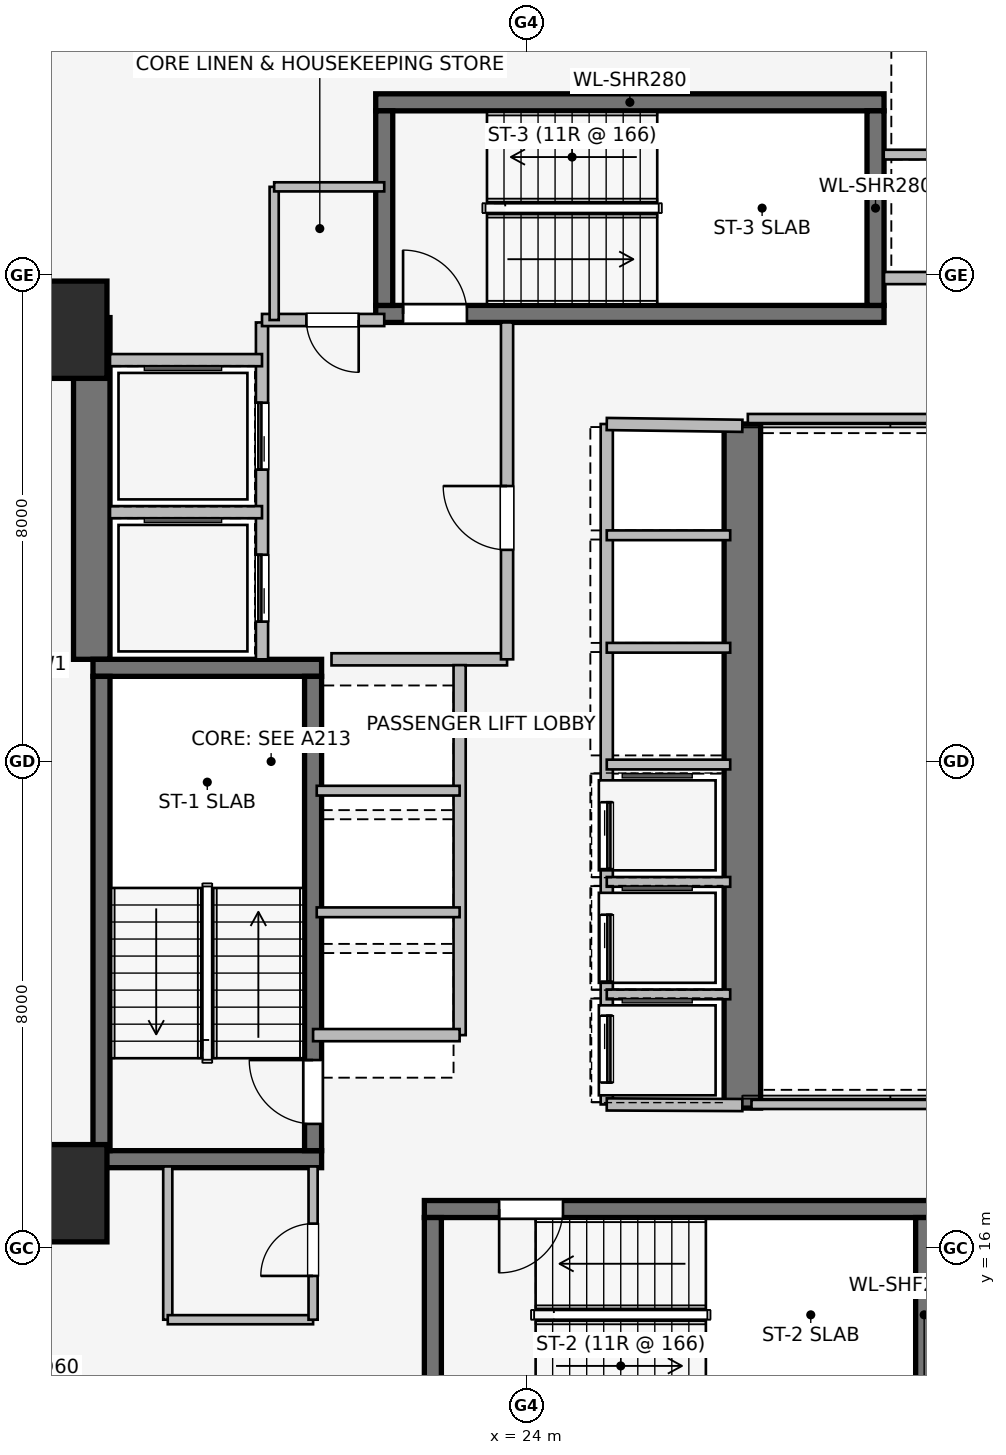
"""IFC4 building model, lengths in metres.
Left out: names, types, materials, properties, quantities, classifications, styles, units other than length and angle.
Written with IfcOpenShell. Run it as: python <this file> out.ifc"""

import sys

from ifc_helpers import new_model, si_unit, direction, frame, frame_2d, origin, origin_2d, place, context, subcontext, project, spatial, rectangle, extrude, element, fill, save


model = new_model("IFC4")
c1 = context("Model", 3, precision=1e-05, world=origin(), true_north=direction((0.0, 1.0)))
c2 = subcontext(c1, "Body", "Model", "MODEL_VIEW")
j1 = project(units=[si_unit("LENGTHUNIT", "METRE"), si_unit("PLANEANGLEUNIT", "RADIAN")], contexts=[c1])
p1 = place(None, origin())
s1 = spatial("IfcSite", under=j1, at=p1, CompositionType="ELEMENT")
p2 = place(p1, origin())
s2 = spatial("IfcBuilding", under=s1, at=p2, CompositionType="ELEMENT")
p3 = place(p2, frame((0.0, 0.0, 45.25)))
s3 = spatial("IfcBuildingStorey", under=s2, at=p3, CompositionType="ELEMENT", Elevation=45.25)
p4 = place(p3, frame((16.85, 25.68, 0.0), z_axis=(0.0, 0.0, 1.0), x_axis=(0.0, 1.0, 0.0)))
e1 = element("IfcWall", 1, at=p4, inside=s3, PredefinedType="SHEAR", context=c2, shape_type="SweptSolid", body=[
    extrude(rectangle(XDim=5.62, YDim=0.6, at=frame_2d((2.81, 0.0))), origin(), (0.0, 0.0, 1.0), 3.65),
])
p5 = place(p3, frame((27.55, 29.55, 0.0), z_axis=(0.0, 0.0, 1.0), x_axis=(0.0, -1.0, 0.0)))
e2 = element("IfcWall", 2, at=p5, inside=s3, PredefinedType="SHEAR", context=c2, shape_type="SweptSolid", body=[
    extrude(rectangle(XDim=11.25, YDim=0.6, at=frame_2d((5.625, 0.0))), origin(), (0.0, 0.0, 1.0), 3.65),
])
for number, where, z_axis, x_axis in (
    (3, (16.87, 17.46, 0.0), (0.0, 0.0, 1.0), (1.0, 0.0, 0.0)),
    (4, (20.63, 25.54, 0.0), (0.0, 0.0, 1.0), (-1.0, 0.0, 0.0)),
):
    element("IfcWall", number, at=place(p3, frame(where, z_axis=z_axis, x_axis=x_axis)), inside=s3, PredefinedType="SHEAR", context=c2, shape_type="SweptSolid", body=[
        extrude(rectangle(XDim=3.76, YDim=0.28, at=frame_2d((1.88, 0.0))), origin(), (0.0, 0.0, 1.0), 3.65),
    ])
p6 = place(p3, frame((17.01, 25.4, 0.0), z_axis=(0.0, 0.0, 1.0), x_axis=(0.0, -1.0, 0.0)))
e5 = element("IfcWall", 5, at=p6, inside=s3, PredefinedType="SHEAR", context=c2, shape_type="SweptSolid", body=[
    extrude(rectangle(XDim=7.8, YDim=0.28, at=frame_2d((3.9, 0.0))), origin(), (0.0, 0.0, 1.0), 3.65),
])
p7 = place(p3, frame((20.49, 17.6, 0.0), z_axis=(0.0, 0.0, 1.0), x_axis=(0.0, 1.0, 0.0)))
e6 = element("IfcWall", 6, at=p7, inside=s3, PredefinedType="SHEAR", context=c2, shape_type="SweptSolid", body=[
    extrude(rectangle(XDim=7.8, YDim=0.28, at=frame_2d((3.9, 0.0))), origin(), (0.0, 0.0, 1.0), 3.65),
])
p8 = place(p7, frame((0.44, 0.0, 0.0)))
e7 = element("IfcOpeningElement", 7, at=p8, cuts=e6, PredefinedType="OPENING", context=c2, shape_type="SweptSolid", body=[
    extrude(rectangle(XDim=1.05, YDim=2.0, at=frame_2d((0.525, 1.0))), frame((0.0, 0.15, 0.0), z_axis=(0.0, -1.0, 0.0), x_axis=(1.0, 0.0, 0.0)), (0.0, 0.0, 1.0), 0.3),
])
p9 = place(p3, frame((30.68, 16.64, 0.0), z_axis=(0.0, 0.0, 1.0), x_axis=(-1.0, 0.0, 0.0)))
e8 = element("IfcWall", 8, at=p9, inside=s3, PredefinedType="SHEAR", context=c2, shape_type="SweptSolid", body=[
    extrude(rectangle(XDim=8.36, YDim=0.28, at=frame_2d((4.18, 0.0))), origin(), (0.0, 0.0, 1.0), 3.65),
])
p10 = place(p9, frame((6.08, 0.0, 0.0)))
e9 = element("IfcOpeningElement", 9, at=p10, cuts=e8, PredefinedType="OPENING", context=c2, shape_type="SweptSolid", body=[
    extrude(rectangle(XDim=1.05, YDim=2.0, at=frame_2d((0.525, 1.0))), frame((0.0, 0.15, 0.0), z_axis=(0.0, -1.0, 0.0), x_axis=(1.0, 0.0, 0.0)), (0.0, 0.0, 1.0), 0.3),
])
for number, where, z_axis, x_axis in (
    (10, (22.46, 16.5, 0.0), (0.0, 0.0, 1.0), (0.0, -1.0, 0.0)),
    (11, (30.54, 13.3, 0.0), (0.0, 0.0, 1.0), (0.0, 1.0, 0.0)),
):
    element("IfcWall", number, at=place(p3, frame(where, z_axis=z_axis, x_axis=x_axis)), inside=s3, PredefinedType="SHEAR", context=c2, shape_type="SweptSolid", body=[
        extrude(rectangle(XDim=3.2, YDim=0.28, at=frame_2d((1.6, 0.0))), origin(), (0.0, 0.0, 1.0), 3.65),
    ])
p11 = place(p3, frame((21.52, 31.36, 0.0), z_axis=(0.0, 0.0, 1.0), x_axis=(1.0, 0.0, 0.0)))
e12 = element("IfcWall", 12, at=p11, inside=s3, PredefinedType="SHEAR", context=c2, shape_type="SweptSolid", body=[
    extrude(rectangle(XDim=8.36, YDim=0.28, at=frame_2d((4.18, 0.0))), origin(), (0.0, 0.0, 1.0), 3.65),
])
p12 = place(p11, frame((0.45, 0.0, 0.0)))
e13 = element("IfcOpeningElement", 13, at=p12, cuts=e12, PredefinedType="OPENING", context=c2, shape_type="SweptSolid", body=[
    extrude(rectangle(XDim=1.05, YDim=2.0, at=frame_2d((0.525, 1.0))), frame((0.0, 0.15, 0.0), z_axis=(0.0, -1.0, 0.0), x_axis=(1.0, 0.0, 0.0)), (0.0, 0.0, 1.0), 0.3),
])
p13 = place(p3, frame((29.88, 34.84, 0.0), z_axis=(0.0, 0.0, 1.0), x_axis=(-1.0, 0.0, 0.0)))
e14 = element("IfcWall", 14, at=p13, inside=s3, PredefinedType="SHEAR", context=c2, shape_type="SweptSolid", body=[
    extrude(rectangle(XDim=8.36, YDim=0.28, at=frame_2d((4.18, 0.0))), origin(), (0.0, 0.0, 1.0), 3.65),
])
for number, where, z_axis, x_axis in (
    (15, (21.66, 34.7, 0.0), (0.0, 0.0, 1.0), (0.0, -1.0, 0.0)),
    (16, (29.74, 31.5, 0.0), (0.0, 0.0, 1.0), (0.0, 1.0, 0.0)),
):
    element("IfcWall", number, at=place(p3, frame(where, z_axis=z_axis, x_axis=x_axis)), inside=s3, PredefinedType="SHEAR", context=c2, shape_type="SweptSolid", body=[
        extrude(rectangle(XDim=3.2, YDim=0.28, at=frame_2d((1.6, 0.0))), origin(), (0.0, 0.0, 1.0), 3.65),
    ])
for number, where, z_axis, x_axis in (
    (17, (16.3, 16.9, 0.0), (0.0, 0.0, 1.0), (1.0, 0.0, 0.0)),
    (18, (16.3, 31.1, 0.0), (0.0, 0.0, 1.0), (1.0, 0.0, 0.0)),
):
    element("IfcColumn", number, at=place(p3, frame(where, z_axis=z_axis, x_axis=x_axis)), inside=s3, PredefinedType="COLUMN", context=c2, shape_type="SweptSolid", body=[
        extrude(rectangle(XDim=1.6, YDim=1.6, at=origin_2d()), origin(), (0.0, 0.0, 1.0), 3.65),
    ])
p14 = place(p3, frame((19.65, 25.68, 0.0), z_axis=(0.0, 0.0, 1.0), x_axis=(0.0, 1.0, 0.0)))
e19 = element("IfcWall", 19, at=p14, inside=s3, PredefinedType="PARTITIONING", context=c2, shape_type="SweptSolid", body=[
    extrude(rectangle(XDim=5.54, YDim=0.2, at=frame_2d((2.77, 0.0))), origin(), (0.0, 0.0, 1.0), 3.39),
])
p15 = place(p14, frame((0.62, 0.0, 0.0)))
e20 = element("IfcOpeningElement", 20, at=p15, cuts=e19, PredefinedType="OPENING", context=c2, shape_type="SweptSolid", body=[
    extrude(rectangle(XDim=1.1, YDim=2.2, at=frame_2d((0.55, 1.1))), frame((0.0, 0.11, 0.0), z_axis=(0.0, -1.0, 0.0), x_axis=(1.0, 0.0, 0.0)), (0.0, 0.0, 1.0), 0.22),
])
p16 = place(p14, frame((3.12, 0.0, 0.0)))
e21 = element("IfcOpeningElement", 21, at=p16, cuts=e19, PredefinedType="OPENING", context=c2, shape_type="SweptSolid", body=[
    extrude(rectangle(XDim=1.1, YDim=2.2, at=frame_2d((0.55, 1.1))), frame((0.0, 0.11, 0.0), z_axis=(0.0, -1.0, 0.0), x_axis=(1.0, 0.0, 0.0)), (0.0, 0.0, 1.0), 0.22),
])
p17 = place(p3, frame((20.793, 25.68, 0.0), z_axis=(0.0, 0.0, 1.0), x_axis=(1.0, 0.0, 0.0)))
e22 = element("IfcWall", 22, at=p17, inside=s3, PredefinedType="PARTITIONING", context=c2, shape_type="SweptSolid", body=[
    extrude(rectangle(XDim=2.887, YDim=0.2, at=frame_2d((1.443, 0.0))), origin(), (0.0, 0.0, 1.0), 3.39),
])
p18 = place(p3, frame((23.68, 25.68, 0.0), z_axis=(0.0, 0.0, 1.0), x_axis=(0.0, 1.0, 0.0)))
e23 = element("IfcWall", 23, at=p18, inside=s3, PredefinedType="PARTITIONING", context=c2, shape_type="SweptSolid", body=[
    extrude(rectangle(XDim=5.54, YDim=0.2, at=frame_2d((2.77, 0.0))), origin(), (0.0, 0.0, 1.0), 3.39),
])
p19 = place(p18, frame((1.8, 0.0, 0.0)))
e24 = element("IfcOpeningElement", 24, at=p19, cuts=e23, PredefinedType="OPENING", context=c2, shape_type="SweptSolid", body=[
    extrude(rectangle(XDim=1.05, YDim=2.0, at=frame_2d((0.525, 1.0))), frame((0.0, 0.11, 0.0), z_axis=(0.0, -1.0, 0.0), x_axis=(1.0, 0.0, 0.0)), (0.0, 0.0, 1.0), 0.22),
])
p20 = place(p3, frame((21.66, 31.26, 0.0), z_axis=(0.0, 0.0, 1.0), x_axis=(-1.0, 0.0, 0.0)))
e25 = element("IfcWall", 25, at=p20, inside=s3, PredefinedType="PARTITIONING", context=c2, shape_type="SweptSolid", body=[
    extrude(rectangle(XDim=2.01, YDim=0.2, at=frame_2d((1.005, 0.0))), origin(), (0.0, 0.0, 1.0), 3.39),
])
p21 = place(p20, frame((0.42, 0.0, 0.0)))
e26 = element("IfcOpeningElement", 26, at=p21, cuts=e25, PredefinedType="OPENING", context=c2, shape_type="SweptSolid", body=[
    extrude(rectangle(XDim=0.86, YDim=2.0, at=frame_2d((0.43, 1.0))), frame((0.0, 0.11, 0.0), z_axis=(0.0, -1.0, 0.0), x_axis=(1.0, 0.0, 0.0)), (0.0, 0.0, 1.0), 0.22),
])
p22 = place(p3, frame((17.15, 28.1, 0.0), z_axis=(0.0, 0.0, 1.0), x_axis=(1.0, 0.0, 0.0)))
e27 = element("IfcWall", 27, at=p22, inside=s3, PredefinedType="PARTITIONING", context=c2, shape_type="SweptSolid", body=[
    extrude(rectangle(XDim=2.5, YDim=0.2, at=frame_2d((1.25, 0.0))), origin(), (0.0, 0.0, 1.0), 3.39),
])
p23 = place(p3, frame((19.65, 30.6, 0.0), z_axis=(0.0, 0.0, 1.0), x_axis=(-1.0, 0.0, 0.0)))
e28 = element("IfcWall", 28, at=p23, inside=s3, PredefinedType="PARTITIONING", context=c2, shape_type="SweptSolid", body=[
    extrude(rectangle(XDim=2.5, YDim=0.2, at=frame_2d((1.25, 0.0))), origin(), (0.0, 0.0, 1.0), 2.29),
])
p24 = place(p3, frame((32.48, 31.95, 0.0), z_axis=(0.0, 0.0, 1.0), x_axis=(-1.0, 0.0, 0.0)))
e29 = element("IfcWall", 29, at=p24, inside=s3, PredefinedType="PARTITIONING", context=c2, shape_type="SweptSolid", body=[
    extrude(rectangle(XDim=2.6, YDim=0.2, at=frame_2d((1.3, 0.0))), origin(), (0.0, 0.0, 1.0), 3.39),
])
p25 = place(p3, frame((29.875, 33.98, 0.0), z_axis=(0.0, 0.0, 1.0), x_axis=(1.0, 0.0, 0.0)))
e30 = element("IfcWall", 30, at=p25, inside=s3, PredefinedType="PARTITIONING", context=c2, shape_type="SweptSolid", body=[
    extrude(rectangle(XDim=2.605, YDim=0.16, at=frame_2d((1.302, 0.0))), origin(), (0.0, 0.0, 1.0), 3.39),
])
p26 = place(p3, frame((22.9, 19.5, 0.0), z_axis=(0.0, 0.0, 1.0), x_axis=(0.0, 1.0, 0.0)))
e31 = element("IfcWall", 31, at=p26, inside=s3, PredefinedType="PARTITIONING", context=c2, shape_type="SweptSolid", body=[
    extrude(rectangle(XDim=6.085, YDim=0.2, at=frame_2d((3.042, 0.0))), origin(), (0.0, 0.0, 1.0), 3.39),
])
p27 = place(p3, frame((20.49, 19.5, 0.0), z_axis=(0.0, 0.0, 1.0), x_axis=(1.0, 0.0, 0.0)))
e32 = element("IfcWall", 32, at=p27, inside=s3, PredefinedType="PARTITIONING", context=c2, shape_type="SweptSolid", body=[
    extrude(rectangle(XDim=2.41, YDim=0.2, at=frame_2d((1.205, 0.0))), origin(), (0.0, 0.0, 1.0), 2.29),
])
for number, where, z_axis, x_axis in (
    (33, (20.55, 21.52, 0.0), (0.0, 0.0, 1.0), (1.0, 0.0, 0.0)),
    (34, (20.55, 23.52, 0.0), (0.0, 0.0, 1.0), (1.0, 0.0, 0.0)),
):
    element("IfcWall", number, at=place(p3, frame(where, z_axis=z_axis, x_axis=x_axis)), inside=s3, PredefinedType="PARTITIONING", context=c2, shape_type="SweptSolid", body=[
        extrude(rectangle(XDim=2.35, YDim=0.16, at=frame_2d((1.175, 0.0))), origin(), (0.0, 0.0, 1.0), 3.39),
    ])
p28 = place(p3, frame((25.32, 29.55, 0.0), z_axis=(0.0, 0.0, 1.0), x_axis=(0.0, -1.0, 0.0)))
e35 = element("IfcWall", 35, at=p28, inside=s3, PredefinedType="PARTITIONING", context=c2, shape_type="SweptSolid", body=[
    extrude(rectangle(XDim=11.19, YDim=0.2, at=frame_2d((5.595, 0.0))), origin(), (0.0, 0.0, 1.0), 3.39),
])
p29 = place(p28, frame((6.22, 0.0, 0.0)))
e36 = element("IfcOpeningElement", 36, at=p29, cuts=e35, PredefinedType="OPENING", context=c2, shape_type="SweptSolid", body=[
    extrude(rectangle(XDim=1.1, YDim=2.2, at=frame_2d((0.55, 1.1))), frame((0.0, 0.11, 0.0), z_axis=(0.0, -1.0, 0.0), x_axis=(1.0, 0.0, 0.0)), (0.0, 0.0, 1.0), 0.22),
])
p30 = place(p28, frame((8.07, 0.0, 0.0)))
e37 = element("IfcOpeningElement", 37, at=p30, cuts=e35, PredefinedType="OPENING", context=c2, shape_type="SweptSolid", body=[
    extrude(rectangle(XDim=1.1, YDim=2.2, at=frame_2d((0.55, 1.1))), frame((0.0, 0.11, 0.0), z_axis=(0.0, -1.0, 0.0), x_axis=(1.0, 0.0, 0.0)), (0.0, 0.0, 1.0), 0.22),
])
p31 = place(p28, frame((9.73, 0.0, 0.0)))
e38 = element("IfcOpeningElement", 38, at=p31, cuts=e35, PredefinedType="OPENING", context=c2, shape_type="SweptSolid", body=[
    extrude(rectangle(XDim=1.1, YDim=2.2, at=frame_2d((0.55, 1.1))), frame((0.0, 0.11, 0.0), z_axis=(0.0, -1.0, 0.0), x_axis=(1.0, 0.0, 0.0)), (0.0, 0.0, 1.0), 0.22),
])
p32 = place(p3, frame((25.32, 18.36, 0.0), z_axis=(0.0, 0.0, 1.0), x_axis=(0.999989925833, -0.004488678231, 0.0)))
e39 = element("IfcWall", 39, at=p32, inside=s3, PredefinedType="PARTITIONING", context=c2, shape_type="SweptSolid", body=[
    extrude(rectangle(XDim=2.23, YDim=0.2, at=frame_2d((1.115, 0.0))), origin(), (0.0, 0.0, 1.0), 3.39),
])
p33 = place(p3, frame((27.55, 29.52, 0.0), z_axis=(0.0, 0.0, 1.0), x_axis=(-0.999909343457, 0.013464949556, 0.0)))
e40 = element("IfcWall", 40, at=p33, inside=s3, PredefinedType="PARTITIONING", context=c2, shape_type="SweptSolid", body=[
    extrude(rectangle(XDim=2.23, YDim=0.2, at=frame_2d((1.115, 0.0))), origin(), (0.0, 0.0, 1.0), 2.29),
])
for number, where, z_axis, x_axis in (
    (41, (25.32, 20.17, 0.0), (0.0, 0.0, 1.0), (1.0, 0.0, 0.0)),
    (42, (25.32, 22.02, 0.0), (0.0, 0.0, 1.0), (1.0, 0.0, 0.0)),
    (43, (25.32, 23.95, 0.0), (0.0, 0.0, 1.0), (1.0, 0.0, 0.0)),
    (44, (25.32, 25.87, 0.0), (0.0, 0.0, 1.0), (1.0, 0.0, 0.0)),
    (45, (25.32, 27.72, 0.0), (0.0, 0.0, 1.0), (1.0, 0.0, 0.0)),
):
    element("IfcWall", number, at=place(p3, frame(where, z_axis=z_axis, x_axis=x_axis)), inside=s3, PredefinedType="PARTITIONING", context=c2, shape_type="SweptSolid", body=[
        extrude(rectangle(XDim=2.03, YDim=0.16, at=frame_2d((1.015, 0.0))), origin(), (0.0, 0.0, 1.0), 3.39),
    ])
p34 = place(p3, frame((18.1, 17.34, 0.0), z_axis=(0.0, 0.0, 1.0), x_axis=(0.0, -1.0, 0.0)))
e46 = element("IfcWall", 46, at=p34, inside=s3, PredefinedType="PARTITIONING", context=c2, shape_type="SweptSolid", body=[
    extrude(rectangle(XDim=2.52, YDim=0.15, at=frame_2d((1.26, 0.0))), origin(), (0.0, 0.0, 1.0), 3.39),
])
p35 = place(p3, frame((18.1, 14.82, 0.0), z_axis=(0.0, 0.0, 1.0), x_axis=(1.0, 0.0, 0.0)))
e47 = element("IfcWall", 47, at=p35, inside=s3, PredefinedType="PARTITIONING", context=c2, shape_type="SweptSolid", body=[
    extrude(rectangle(XDim=2.39, YDim=0.15, at=frame_2d((1.195, 0.0))), origin(), (0.0, 0.0, 1.0), 3.39),
])
p36 = place(p3, frame((20.49, 14.82, 0.0), z_axis=(0.0, 0.0, 1.0), x_axis=(0.0, 1.0, 0.0)))
e48 = element("IfcWall", 48, at=p36, inside=s3, PredefinedType="PARTITIONING", context=c2, shape_type="SweptSolid", body=[
    extrude(rectangle(XDim=2.52, YDim=0.15, at=frame_2d((1.26, 0.0))), origin(), (0.0, 0.0, 1.0), 3.39),
])
p37 = place(p36, frame((0.72, 0.0, 0.0)))
e49 = element("IfcOpeningElement", 49, at=p37, cuts=e48, PredefinedType="OPENING", context=c2, shape_type="SweptSolid", body=[
    extrude(rectangle(XDim=0.86, YDim=2.0, at=frame_2d((0.43, 1.0))), frame((0.0, 0.085, 0.0), z_axis=(0.0, -1.0, 0.0), x_axis=(1.0, 0.0, 0.0)), (0.0, 0.0, 1.0), 0.17),
])
p38 = place(p3, frame((19.85, 33.45, 0.0), z_axis=(0.0, 0.0, 1.0), x_axis=(0.0, -1.0, 0.0)))
e50 = element("IfcWall", 50, at=p38, inside=s3, PredefinedType="PARTITIONING", context=c2, shape_type="SweptSolid", body=[
    extrude(rectangle(XDim=2.19, YDim=0.15, at=frame_2d((1.095, 0.0))), origin(), (0.0, 0.0, 1.0), 3.39),
])
p39 = place(p3, frame((21.66, 33.45, 0.0), z_axis=(0.0, 0.0, 1.0), x_axis=(-1.0, 0.0, 0.0)))
e51 = element("IfcWall", 51, at=p39, inside=s3, PredefinedType="PARTITIONING", context=c2, shape_type="SweptSolid", body=[
    extrude(rectangle(XDim=1.81, YDim=0.15, at=frame_2d((0.905, 0.0))), origin(), (0.0, 0.0, 1.0), 3.39),
])
p40 = place(p3, frame((27.7, 18.36, 0.0), z_axis=(0.0, 0.0, 1.0), x_axis=(1.0, 0.0, 0.0)))
e52 = element("IfcWall", 52, at=p40, inside=s3, PredefinedType="PARTITIONING", context=c2, shape_type="SweptSolid", body=[
    extrude(rectangle(XDim=12.14, YDim=0.15, at=frame_2d((6.07, 0.0))), origin(), (0.0, 0.0, 1.0), 2.531),
])
p41 = place(p3, frame((39.84, 29.64, 0.0), z_axis=(0.0, 0.0, 1.0), x_axis=(-1.0, 0.0, 0.0)))
e53 = element("IfcWall", 53, at=p41, inside=s3, PredefinedType="PARTITIONING", context=c2, shape_type="SweptSolid", body=[
    extrude(rectangle(XDim=12.2, YDim=0.15, at=frame_2d((6.1, 0.0))), origin(), (0.0, 0.0, 1.0), 2.531),
])
p42 = place(p8, origin())
e54 = element("IfcDoor", 54, at=p42, inside=s3, OperationType="SINGLE_SWING_RIGHT", PredefinedType="DOOR", context=c2, shape_type="SweptSolid", body=[
    extrude(rectangle(XDim=1.05, YDim=2.0, at=frame_2d((0.525, 1.0))), frame((0.0, 0.025, 0.0), z_axis=(0.0, -1.0, 0.0), x_axis=(1.0, 0.0, 0.0)), (0.0, 0.0, 1.0), 0.05),
])
fill(e7, e54)
p43 = place(p10, origin())
e55 = element("IfcDoor", 55, at=p43, inside=s3, OperationType="SINGLE_SWING_RIGHT", PredefinedType="DOOR", context=c2, shape_type="SweptSolid", body=[
    extrude(rectangle(XDim=1.05, YDim=2.0, at=frame_2d((0.525, 1.0))), frame((0.0, 0.025, 0.0), z_axis=(0.0, -1.0, 0.0), x_axis=(1.0, 0.0, 0.0)), (0.0, 0.0, 1.0), 0.05),
])
fill(e9, e55)
p44 = place(p12, origin())
e56 = element("IfcDoor", 56, at=p44, inside=s3, OperationType="SINGLE_SWING_LEFT", PredefinedType="DOOR", context=c2, shape_type="SweptSolid", body=[
    extrude(rectangle(XDim=1.05, YDim=2.0, at=frame_2d((0.525, 1.0))), frame((0.0, 0.025, 0.0), z_axis=(0.0, -1.0, 0.0), x_axis=(1.0, 0.0, 0.0)), (0.0, 0.0, 1.0), 0.05),
])
fill(e13, e56)
p45 = place(p15, origin())
e57 = element("IfcDoor", 57, at=p45, inside=s3, OperationType="SLIDING_TO_LEFT", PredefinedType="DOOR", context=c2, shape_type="SweptSolid", body=[
    extrude(rectangle(XDim=1.1, YDim=2.2, at=frame_2d((0.55, 1.1))), frame((0.0, 0.025, 0.0), z_axis=(0.0, -1.0, 0.0), x_axis=(1.0, 0.0, 0.0)), (0.0, 0.0, 1.0), 0.05),
])
fill(e20, e57)
p46 = place(p16, origin())
e58 = element("IfcDoor", 58, at=p46, inside=s3, OperationType="SLIDING_TO_LEFT", PredefinedType="DOOR", context=c2, shape_type="SweptSolid", body=[
    extrude(rectangle(XDim=1.1, YDim=2.2, at=frame_2d((0.55, 1.1))), frame((0.0, 0.025, 0.0), z_axis=(0.0, -1.0, 0.0), x_axis=(1.0, 0.0, 0.0)), (0.0, 0.0, 1.0), 0.05),
])
fill(e21, e58)
p47 = place(p19, origin())
e59 = element("IfcDoor", 59, at=p47, inside=s3, OperationType="SINGLE_SWING_RIGHT", PredefinedType="DOOR", context=c2, shape_type="SweptSolid", body=[
    extrude(rectangle(XDim=1.05, YDim=2.0, at=frame_2d((0.525, 1.0))), frame((0.0, 0.025, 0.0), z_axis=(0.0, -1.0, 0.0), x_axis=(1.0, 0.0, 0.0)), (0.0, 0.0, 1.0), 0.05),
])
fill(e24, e59)
p48 = place(p21, origin())
e60 = element("IfcDoor", 60, at=p48, inside=s3, OperationType="SINGLE_SWING_LEFT", PredefinedType="DOOR", context=c2, shape_type="SweptSolid", body=[
    extrude(rectangle(XDim=0.86, YDim=2.0, at=frame_2d((0.43, 1.0))), frame((0.0, 0.025, 0.0), z_axis=(0.0, -1.0, 0.0), x_axis=(1.0, 0.0, 0.0)), (0.0, 0.0, 1.0), 0.05),
])
fill(e26, e60)
p49 = place(p29, origin())
e61 = element("IfcDoor", 61, at=p49, inside=s3, OperationType="SLIDING_TO_LEFT", PredefinedType="DOOR", context=c2, shape_type="SweptSolid", body=[
    extrude(rectangle(XDim=1.1, YDim=2.2, at=frame_2d((0.55, 1.1))), frame((0.0, 0.025, 0.0), z_axis=(0.0, -1.0, 0.0), x_axis=(1.0, 0.0, 0.0)), (0.0, 0.0, 1.0), 0.05),
])
fill(e36, e61)
p50 = place(p30, origin())
e62 = element("IfcDoor", 62, at=p50, inside=s3, OperationType="SLIDING_TO_LEFT", PredefinedType="DOOR", context=c2, shape_type="SweptSolid", body=[
    extrude(rectangle(XDim=1.1, YDim=2.2, at=frame_2d((0.55, 1.1))), frame((0.0, 0.025, 0.0), z_axis=(0.0, -1.0, 0.0), x_axis=(1.0, 0.0, 0.0)), (0.0, 0.0, 1.0), 0.05),
])
fill(e37, e62)
p51 = place(p31, origin())
e63 = element("IfcDoor", 63, at=p51, inside=s3, OperationType="SLIDING_TO_LEFT", PredefinedType="DOOR", context=c2, shape_type="SweptSolid", body=[
    extrude(rectangle(XDim=1.1, YDim=2.2, at=frame_2d((0.55, 1.1))), frame((0.0, 0.025, 0.0), z_axis=(0.0, -1.0, 0.0), x_axis=(1.0, 0.0, 0.0)), (0.0, 0.0, 1.0), 0.05),
])
fill(e38, e63)
p52 = place(p37, origin())
e64 = element("IfcDoor", 64, at=p52, inside=s3, OperationType="SINGLE_SWING_LEFT", PredefinedType="DOOR", context=c2, shape_type="SweptSolid", body=[
    extrude(rectangle(XDim=0.86, YDim=2.0, at=frame_2d((0.43, 1.0))), frame((0.0, 0.025, 0.0), z_axis=(0.0, -1.0, 0.0), x_axis=(1.0, 0.0, 0.0)), (0.0, 0.0, 1.0), 0.05),
])
fill(e49, e64)
save(model, sys.argv[1])
